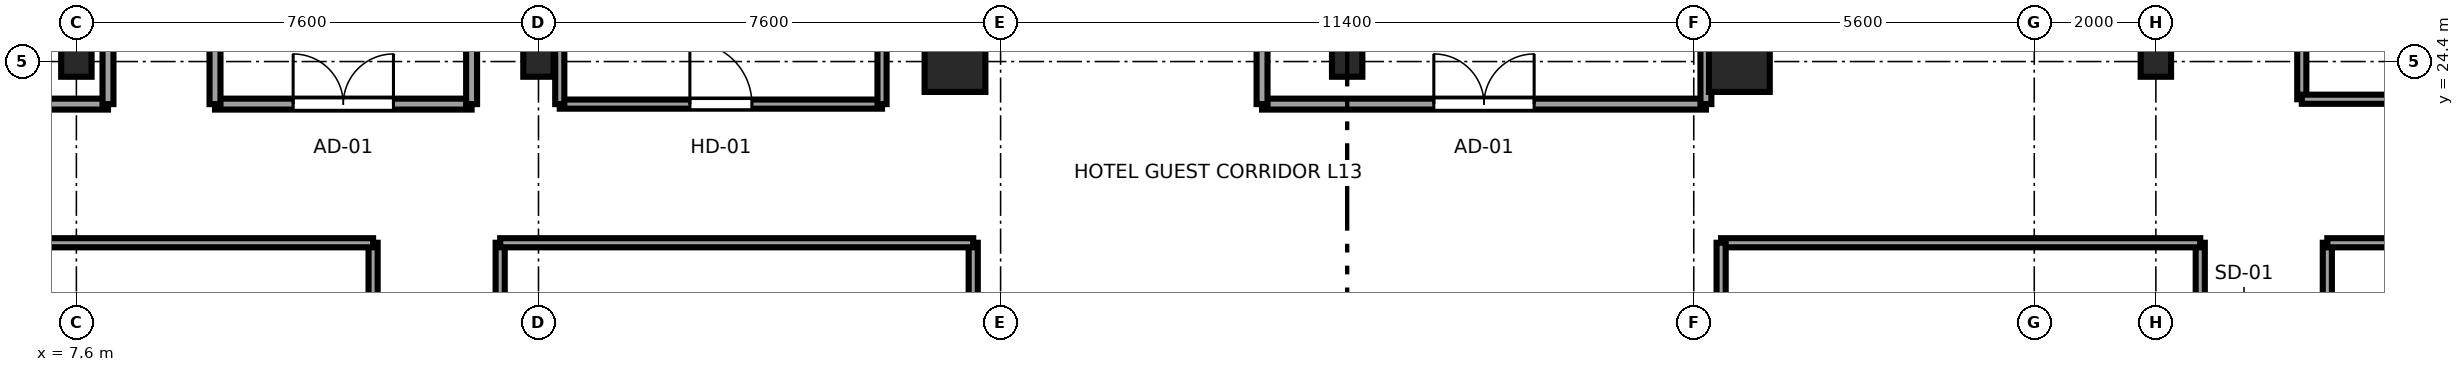
"""IFC4 building model, lengths in metres.
Left out: names, types, materials, properties, quantities, classifications, styles, units other than length and angle.
Written with IfcOpenShell. Run it as: python <this file> out.ifc"""

import sys

from ifc_helpers import new_model, si_unit, direction, frame, frame_2d, origin, origin_2d, place, context, subcontext, project, spatial, rectangle, i_section, extrude, source, transform, mapped, element, fill, save


model = new_model("IFC4")
c1 = context("Model", 3, precision=1e-05, world=origin(), true_north=direction((0.0, 1.0)))
c2 = subcontext(c1, "Body", "Model", "MODEL_VIEW")
j1 = project(units=[si_unit("LENGTHUNIT", "METRE"), si_unit("PLANEANGLEUNIT", "RADIAN")], contexts=[c1])
p1 = place(None, origin())
s1 = spatial("IfcSite", under=j1, at=p1, CompositionType="ELEMENT")
p2 = place(p1, origin())
s2 = spatial("IfcBuilding", under=s1, at=p2, CompositionType="ELEMENT")
p3 = place(p2, frame((0.0, 0.0, 56.85)))
s3 = spatial("IfcBuildingStorey", under=s2, at=p3, CompositionType="ELEMENT", Elevation=56.85)
m1 = source(origin(), c2, "Body", "SweptSolid", [
    extrude(i_section(OverallWidth=0.5, OverallDepth=0.5, WebThickness=0.028, FlangeThickness=0.045, at=origin_2d()), origin(), (0.0, 0.0, 1.0), 3.55),
])
for number, where, z_axis, x_axis in (
    (1, (7.6, 24.4, 0.0), (0.0, 0.0, 1.0), (1.0, 0.0, 0.0)),
    (2, (15.2, 24.4, 0.0), (0.0, 0.0, 1.0), (1.0, 0.0, 0.0)),
):
    element("IfcColumn", number, at=place(p3, frame(where, z_axis=z_axis, x_axis=x_axis)), inside=s3, PredefinedType="COLUMN", context=c2, shape_type="MappedRepresentation", body=[
        mapped(m1, transform((0.0, 0.0, 0.0), x_axis=(1.0, 0.0, 0.0), y_axis=(0.0, 1.0, 0.0), z_axis=(0.0, 0.0, 1.0), scale=1.0)),
    ])
m2 = source(origin(), c2, "Body", "SweptSolid", [
    extrude(rectangle(XDim=1.0, YDim=1.0, at=origin_2d()), origin(), (0.0, 0.0, 1.0), 3.55),
])
for number, where, z_axis, x_axis in (
    (3, (22.05, 24.4, 0.0), (0.0, 0.0, 1.0), (1.0, 0.0, 0.0)),
    (4, (34.95, 24.4, 0.0), (0.0, 0.0, 1.0), (1.0, 0.0, 0.0)),
):
    element("IfcColumn", number, at=place(p3, frame(where, z_axis=z_axis, x_axis=x_axis)), inside=s3, PredefinedType="COLUMN", context=c2, shape_type="MappedRepresentation", body=[
        mapped(m2, transform((0.0, 0.0, 0.0), x_axis=(1.0, 0.0, 0.0), y_axis=(0.0, 1.0, 0.0), z_axis=(0.0, 0.0, 1.0), scale=1.0)),
    ])
for number, where, z_axis, x_axis in (
    (5, (41.8, 24.4, 0.0), (0.0, 0.0, 1.0), (1.0, 0.0, 0.0)),
    (6, (28.5, 24.4, 0.0), (0.0, 0.0, 1.0), (1.0, 0.0, 0.0)),
):
    element("IfcColumn", number, at=place(p3, frame(where, z_axis=z_axis, x_axis=x_axis)), inside=s3, PredefinedType="COLUMN", context=c2, shape_type="MappedRepresentation", body=[
        mapped(m1, transform((0.0, 0.0, 0.0), x_axis=(1.0, 0.0, 0.0), y_axis=(0.0, 1.0, 0.0), z_axis=(0.0, 0.0, 1.0), scale=1.0)),
    ])
p4 = place(p3, frame((12.48, 17.01, 0.0), z_axis=(0.0, 0.0, 1.0), x_axis=(0.0, 1.0, 0.0)))
e7 = element("IfcWall", 7, at=p4, inside=s3, PredefinedType="PARTITIONING", context=c2, shape_type="SweptSolid", body=[
    extrude(rectangle(XDim=4.41, YDim=0.15, at=frame_2d((2.205, 0.0))), origin(), (0.0, 0.0, 1.0), 3.37),
])
p5 = place(p4, frame((1.695, 0.0, 0.0)))
e8 = element("IfcOpeningElement", 8, at=p5, cuts=e7, PredefinedType="OPENING", context=c2, shape_type="SweptSolid", body=[
    extrude(rectangle(XDim=0.98, YDim=2.12, at=frame_2d((0.49, 1.06))), frame((0.0, 0.085, 0.0), z_axis=(0.0, -1.0, 0.0), x_axis=(1.0, 0.0, 0.0)), (0.0, 0.0, 1.0), 0.17),
])
p6 = place(p3, frame((0.3, 21.42, 0.0), z_axis=(0.0, 0.0, 1.0), x_axis=(1.0, 0.0, 0.0)))
e9 = element("IfcWall", 9, at=p6, inside=s3, PredefinedType="PARTITIONING", context=c2, shape_type="SweptSolid", body=[
    extrude(rectangle(XDim=12.18, YDim=0.15, at=frame_2d((6.09, 0.0))), origin(), (0.0, 0.0, 1.0), 3.37),
])
p7 = place(p3, frame((14.57, 13.41, 0.0), z_axis=(0.0, 0.0, 1.0), x_axis=(0.0, 1.0, 0.0)))
e10 = element("IfcWall", 10, at=p7, inside=s3, PredefinedType="PARTITIONING", context=c2, shape_type="SweptSolid", body=[
    extrude(rectangle(XDim=8.01, YDim=0.15, at=frame_2d((4.005, 0.0))), origin(), (0.0, 0.0, 1.0), 3.37),
])
p8 = place(p7, frame((3.795, 0.0, 0.0)))
e11 = element("IfcOpeningElement", 11, at=p8, cuts=e10, PredefinedType="OPENING", context=c2, shape_type="SweptSolid", body=[
    extrude(rectangle(XDim=0.98, YDim=2.12, at=frame_2d((0.49, 1.06))), frame((0.0, 0.085, 0.0), z_axis=(0.0, -1.0, 0.0), x_axis=(1.0, 0.0, 0.0)), (0.0, 0.0, 1.0), 0.17),
])
p9 = place(p3, frame((22.35, 11.08, 0.0), z_axis=(0.0, 0.0, 1.0), x_axis=(0.0, 1.0, 0.0)))
e12 = element("IfcWall", 12, at=p9, inside=s3, PredefinedType="PARTITIONING", context=c2, shape_type="SweptSolid", body=[
    extrude(rectangle(XDim=10.34, YDim=0.15, at=frame_2d((5.17, 0.0))), origin(), (0.0, 0.0, 1.0), 3.37),
])
p10 = place(p3, frame((14.57, 21.42, 0.0), z_axis=(0.0, 0.0, 1.0), x_axis=(1.0, 0.0, 0.0)))
e13 = element("IfcWall", 13, at=p10, inside=s3, PredefinedType="PARTITIONING", context=c2, shape_type="SweptSolid", body=[
    extrude(rectangle(XDim=7.78, YDim=0.15, at=frame_2d((3.89, 0.0))), origin(), (0.0, 0.0, 1.0), 3.37),
])
p11 = place(p3, frame((42.53, 18.437, 0.0), z_axis=(0.0, 0.0, 1.0), x_axis=(0.0, 1.0, 0.0)))
e14 = element("IfcWall", 14, at=p11, inside=s3, PredefinedType="PARTITIONING", context=c2, shape_type="SweptSolid", body=[
    extrude(rectangle(XDim=2.983, YDim=0.15, at=frame_2d((1.491, 0.0))), origin(), (0.0, 0.0, 1.0), 3.37),
])
p12 = place(p11, frame((0.981, 0.0, 0.0)))
e15 = element("IfcOpeningElement", 15, at=p12, cuts=e14, PredefinedType="OPENING", context=c2, shape_type="SweptSolid", body=[
    extrude(rectangle(XDim=0.98, YDim=2.12, at=frame_2d((0.49, 1.06))), frame((0.0, 0.085, 0.0), z_axis=(0.0, -1.0, 0.0), x_axis=(1.0, 0.0, 0.0)), (0.0, 0.0, 1.0), 0.17),
])
p13 = place(p3, frame((34.65, 21.42, 0.0), z_axis=(0.0, 0.0, 1.0), x_axis=(1.0, 0.0, 0.0)))
e16 = element("IfcWall", 16, at=p13, inside=s3, PredefinedType="PARTITIONING", context=c2, shape_type="SweptSolid", body=[
    extrude(rectangle(XDim=7.88, YDim=0.15, at=frame_2d((3.94, 0.0))), origin(), (0.0, 0.0, 1.0), 3.37),
])
p14 = place(p3, frame((34.65, 16.48, 0.0), z_axis=(0.0, 0.0, 1.0), x_axis=(0.0, 1.0, 0.0)))
e17 = element("IfcWall", 17, at=p14, inside=s3, PredefinedType="PARTITIONING", context=c2, shape_type="SweptSolid", body=[
    extrude(rectangle(XDim=4.94, YDim=0.15, at=frame_2d((2.47, 0.0))), origin(), (0.0, 0.0, 1.0), 3.37),
])
p15 = place(p3, frame((44.62, 18.313, 0.0), z_axis=(0.0, 0.0, 1.0), x_axis=(0.0, 1.0, 0.0)))
e18 = element("IfcWall", 18, at=p15, inside=s3, PredefinedType="PARTITIONING", context=c2, shape_type="SweptSolid", body=[
    extrude(rectangle(XDim=3.107, YDim=0.15, at=frame_2d((1.553, 0.0))), origin(), (0.0, 0.0, 1.0), 3.37),
])
p16 = place(p15, frame((1.043, 0.0, 0.0)))
e19 = element("IfcOpeningElement", 19, at=p16, cuts=e18, PredefinedType="OPENING", context=c2, shape_type="SweptSolid", body=[
    extrude(rectangle(XDim=0.98, YDim=2.12, at=frame_2d((0.49, 1.06))), frame((0.0, 0.085, 0.0), z_axis=(0.0, -1.0, 0.0), x_axis=(1.0, 0.0, 0.0)), (0.0, 0.0, 1.0), 0.17),
])
p17 = place(p3, frame((44.62, 21.42, 0.0), z_axis=(0.0, 0.0, 1.0), x_axis=(1.0, 0.0, 0.0)))
e20 = element("IfcWall", 20, at=p17, inside=s3, PredefinedType="PARTITIONING", context=c2, shape_type="SweptSolid", body=[
    extrude(rectangle(XDim=11.975, YDim=0.15, at=frame_2d((5.987, 0.0))), origin(), (0.0, 0.0, 1.0), 3.37),
])
p18 = place(p3, frame((0.3, 23.7, 0.0), z_axis=(0.0, 0.0, 1.0), x_axis=(1.0, 0.0, 0.0)))
e21 = element("IfcWall", 21, at=p18, inside=s3, PredefinedType="PARTITIONING", context=c2, shape_type="SweptSolid", body=[
    extrude(rectangle(XDim=7.82, YDim=0.18, at=frame_2d((3.91, 0.0))), origin(), (0.0, 0.0, 1.0), 3.37),
])
p19 = place(p18, frame((3.085, 0.0, 0.0)))
e22 = element("IfcOpeningElement", 22, at=p19, cuts=e21, PredefinedType="OPENING", context=c2, shape_type="SweptSolid", body=[
    extrude(rectangle(XDim=1.65, YDim=2.15, at=frame_2d((0.825, 1.075))), frame((0.0, 0.1, 0.0), z_axis=(0.0, -1.0, 0.0), x_axis=(1.0, 0.0, 0.0)), (0.0, 0.0, 1.0), 0.2),
])
p20 = place(p3, frame((8.12, 23.7, 0.0), z_axis=(0.0, 0.0, 1.0), x_axis=(0.0, 1.0, 0.0)))
e23 = element("IfcWall", 23, at=p20, inside=s3, PredefinedType="PARTITIONING", context=c2, shape_type="SweptSolid", body=[
    extrude(rectangle(XDim=3.6, YDim=0.18, at=frame_2d((1.8, 0.0))), origin(), (0.0, 0.0, 1.0), 3.37),
])
p21 = place(p3, frame((44.2, 23.78, 0.0), z_axis=(0.0, 0.0, 1.0), x_axis=(0.0, 1.0, 0.0)))
e24 = element("IfcWall", 24, at=p21, inside=s3, PredefinedType="PARTITIONING", context=c2, shape_type="SweptSolid", body=[
    extrude(rectangle(XDim=5.69, YDim=0.15, at=frame_2d((2.845, 0.0))), origin(), (0.0, 0.0, 1.0), 3.37),
])
p22 = place(p21, frame((2.355, 0.0, 0.0)))
e25 = element("IfcOpeningElement", 25, at=p22, cuts=e24, PredefinedType="OPENING", context=c2, shape_type="SweptSolid", body=[
    extrude(rectangle(XDim=0.98, YDim=2.12, at=frame_2d((0.49, 1.06))), frame((0.0, 0.085, 0.0), z_axis=(0.0, -1.0, 0.0), x_axis=(1.0, 0.0, 0.0)), (0.0, 0.0, 1.0), 0.17),
])
p23 = place(p3, frame((44.2, 23.78, 0.0), z_axis=(0.0, 0.0, 1.0), x_axis=(1.0, 0.0, 0.0)))
e26 = element("IfcWall", 26, at=p23, inside=s3, PredefinedType="PARTITIONING", context=c2, shape_type="SweptSolid", body=[
    extrude(rectangle(XDim=12.395, YDim=0.15, at=frame_2d((6.198, 0.0))), origin(), (0.0, 0.0, 1.0), 3.37),
])
p24 = place(p3, frame((9.88, 23.7, 0.0), z_axis=(0.0, 0.0, 1.0), x_axis=(1.0, 0.0, 0.0)))
e27 = element("IfcWall", 27, at=p24, inside=s3, PredefinedType="PARTITIONING", context=c2, shape_type="SweptSolid", body=[
    extrude(rectangle(XDim=4.22, YDim=0.18, at=frame_2d((2.11, 0.0))), origin(), (0.0, 0.0, 1.0), 3.37),
])
p25 = place(p24, frame((1.285, 0.0, 0.0)))
e28 = element("IfcOpeningElement", 28, at=p25, cuts=e27, PredefinedType="OPENING", context=c2, shape_type="SweptSolid", body=[
    extrude(rectangle(XDim=1.65, YDim=2.15, at=frame_2d((0.825, 1.075))), frame((0.0, 0.1, 0.0), z_axis=(0.0, -1.0, 0.0), x_axis=(1.0, 0.0, 0.0)), (0.0, 0.0, 1.0), 0.2),
])
for number, where, z_axis, x_axis in (
    (29, (9.88, 23.7, 0.0), (0.0, 0.0, 1.0), (0.0, 1.0, 0.0)),
    (30, (14.1, 23.7, 0.0), (0.0, 0.0, 1.0), (0.0, 1.0, 0.0)),
):
    element("IfcWall", number, at=place(p3, frame(where, z_axis=z_axis, x_axis=x_axis)), inside=s3, PredefinedType="PARTITIONING", context=c2, shape_type="SweptSolid", body=[
        extrude(rectangle(XDim=6.05, YDim=0.18, at=frame_2d((3.025, 0.0))), origin(), (0.0, 0.0, 1.0), 3.37),
    ])
p26 = place(p3, frame((27.1, 23.7, 0.0), z_axis=(0.0, 0.0, 1.0), x_axis=(1.0, 0.0, 0.0)))
e31 = element("IfcWall", 31, at=p26, inside=s3, PredefinedType="PARTITIONING", context=c2, shape_type="SweptSolid", body=[
    extrude(rectangle(XDim=7.3, YDim=0.18, at=frame_2d((3.65, 0.0))), origin(), (0.0, 0.0, 1.0), 3.37),
])
p27 = place(p26, frame((2.825, 0.0, 0.0)))
e32 = element("IfcOpeningElement", 32, at=p27, cuts=e31, PredefinedType="OPENING", context=c2, shape_type="SweptSolid", body=[
    extrude(rectangle(XDim=1.65, YDim=2.15, at=frame_2d((0.825, 1.075))), frame((0.0, 0.1, 0.0), z_axis=(0.0, -1.0, 0.0), x_axis=(1.0, 0.0, 0.0)), (0.0, 0.0, 1.0), 0.2),
])
for number, where, z_axis, x_axis in (
    (33, (27.1, 23.7, 0.0), (0.0, 0.0, 1.0), (0.0, 1.0, 0.0)),
    (34, (34.4, 23.7, 0.0), (0.0, 0.0, 1.0), (0.0, 1.0, 0.0)),
):
    element("IfcWall", number, at=place(p3, frame(where, z_axis=z_axis, x_axis=x_axis)), inside=s3, PredefinedType="PARTITIONING", context=c2, shape_type="SweptSolid", body=[
        extrude(rectangle(XDim=6.1, YDim=0.18, at=frame_2d((3.05, 0.0))), origin(), (0.0, 0.0, 1.0), 3.37),
    ])
p28 = place(p3, frame((15.55, 23.7, 0.0), z_axis=(0.0, 0.0, 1.0), x_axis=(1.0, 0.0, 0.0)))
e35 = element("IfcWall", 35, at=p28, inside=s3, PredefinedType="PARTITIONING", context=c2, shape_type="SweptSolid", body=[
    extrude(rectangle(XDim=5.3, YDim=0.15, at=frame_2d((2.65, 0.0))), origin(), (0.0, 0.0, 1.0), 3.37),
])
p29 = place(p28, frame((2.14, 0.0, 0.0)))
e36 = element("IfcOpeningElement", 36, at=p29, cuts=e35, PredefinedType="OPENING", context=c2, shape_type="SweptSolid", body=[
    extrude(rectangle(XDim=1.02, YDim=2.03, at=frame_2d((0.51, 1.015))), frame((0.0, 0.085, 0.0), z_axis=(0.0, -1.0, 0.0), x_axis=(1.0, 0.0, 0.0)), (0.0, 0.0, 1.0), 0.17),
])
for number, where, z_axis, x_axis in (
    (37, (15.55, 23.7, 0.0), (0.0, 0.0, 1.0), (0.0, 1.0, 0.0)),
    (38, (20.85, 23.7, 0.0), (0.0, 0.0, 1.0), (0.0, 1.0, 0.0)),
):
    element("IfcWall", number, at=place(p3, frame(where, z_axis=z_axis, x_axis=x_axis)), inside=s3, PredefinedType="PARTITIONING", context=c2, shape_type="SweptSolid", body=[
        extrude(rectangle(XDim=6.1, YDim=0.15, at=frame_2d((3.05, 0.0))), origin(), (0.0, 0.0, 1.0), 3.37),
    ])
m3 = source(origin(), c2, "Body", "SweptSolid", [
    extrude(rectangle(XDim=1.65, YDim=2.15, at=frame_2d((0.825, 1.075))), frame((0.0, 0.025, 0.0), z_axis=(0.0, -1.0, 0.0), x_axis=(1.0, 0.0, 0.0)), (0.0, 0.0, 1.0), 0.05),
])
p30 = place(p25, origin())
e39 = element("IfcDoor", 39, at=p30, inside=s3, OperationType="DOUBLE_DOOR_SINGLE_SWING", PredefinedType="DOOR", context=c2, shape_type="MappedRepresentation", body=[
    mapped(m3, transform((0.0, 0.0, 0.0), x_axis=(1.0, 0.0, 0.0), y_axis=(0.0, 1.0, 0.0), z_axis=(0.0, 0.0, 1.0), scale=1.0)),
])
fill(e28, e39)
p31 = place(p27, origin())
e40 = element("IfcDoor", 40, at=p31, inside=s3, OperationType="DOUBLE_DOOR_SINGLE_SWING", PredefinedType="DOOR", context=c2, shape_type="MappedRepresentation", body=[
    mapped(m3, transform((0.0, 0.0, 0.0), x_axis=(1.0, 0.0, 0.0), y_axis=(0.0, 1.0, 0.0), z_axis=(0.0, 0.0, 1.0), scale=1.0)),
])
fill(e32, e40)
m4 = source(origin(), c2, "Body", "SweptSolid", [
    extrude(rectangle(XDim=1.02, YDim=2.03, at=frame_2d((0.51, 1.015))), frame((0.0, 0.025, 0.0), z_axis=(0.0, -1.0, 0.0), x_axis=(1.0, 0.0, 0.0)), (0.0, 0.0, 1.0), 0.05),
])
p32 = place(p29, origin())
e41 = element("IfcDoor", 41, at=p32, inside=s3, OperationType="SINGLE_SWING_LEFT", PredefinedType="DOOR", context=c2, shape_type="MappedRepresentation", body=[
    mapped(m4, transform((0.0, 0.0, 0.0), x_axis=(1.0, 0.0, 0.0), y_axis=(0.0, 1.0, 0.0), z_axis=(0.0, 0.0, 1.0), scale=1.0)),
])
fill(e36, e41)
save(model, sys.argv[1])
